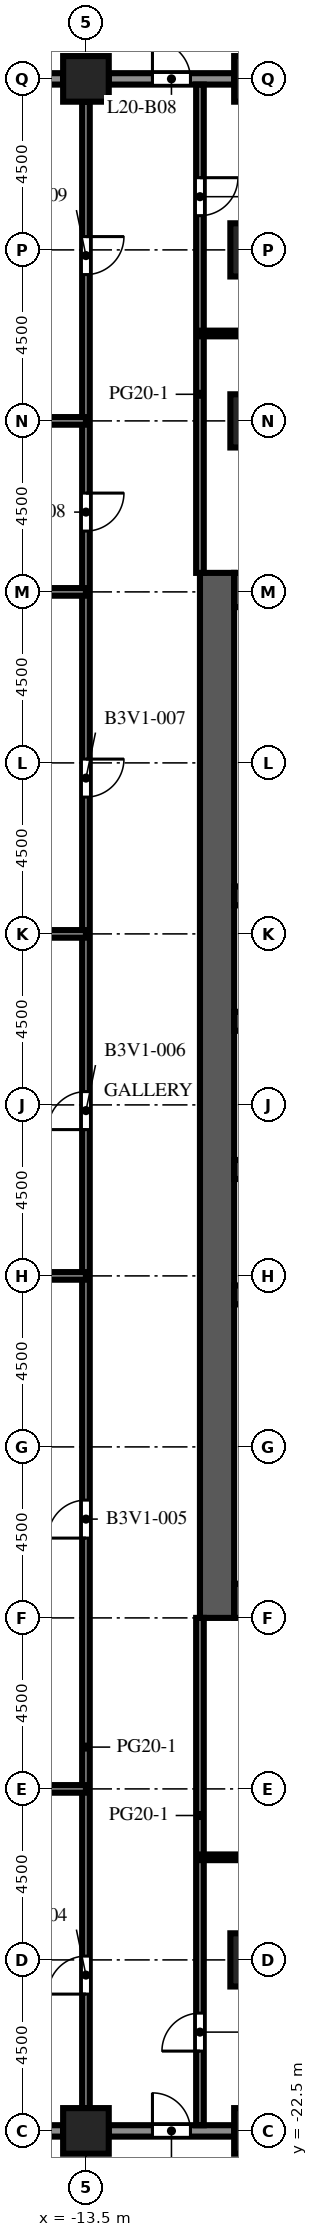
"""IFC4 building model, lengths in metres.
Left out: names, types, materials, properties, quantities, classifications, styles, units other than length and angle.
Written with IfcOpenShell. Run it as: python <this file> out.ifc"""

import sys

from ifc_helpers import new_model, si_unit, direction, frame, frame_2d, origin, origin_2d, place, context, subcontext, project, spatial, rectangle, extrude, element, fill, save


model = new_model("IFC4")
c1 = context("Model", 3, precision=1e-05, world=origin(), true_north=direction((0.0, 1.0)))
c2 = subcontext(c1, "Body", "Model", "MODEL_VIEW")
j1 = project(units=[si_unit("LENGTHUNIT", "METRE"), si_unit("PLANEANGLEUNIT", "RADIAN")], contexts=[c1])
p1 = place(None, origin())
s1 = spatial("IfcSite", under=j1, at=p1, CompositionType="ELEMENT")
p2 = place(p1, origin())
s2 = spatial("IfcBuilding", under=s1, at=p2, CompositionType="ELEMENT")
p3 = place(p2, frame((0.0, 0.0, 90.2)))
s3 = spatial("IfcBuildingStorey", under=s2, at=p3, CompositionType="ELEMENT", Elevation=90.2)
for number, where, z_axis, x_axis in (
    (1, (-13.5, -22.5, 0.0), (0.0, 0.0, 1.0), (1.0, 0.0, 0.0)),
    (2, (-13.5, 31.5, 0.0), (0.0, 0.0, 1.0), (1.0, 0.0, 0.0)),
    (3, (-9.0, -22.5, 0.0), (0.0, 0.0, 1.0), (1.0, 0.0, 0.0)),
    (4, (-9.0, 31.5, 0.0), (0.0, 0.0, 1.0), (1.0, 0.0, 0.0)),
):
    element("IfcColumn", number, at=place(p3, frame(where, z_axis=z_axis, x_axis=x_axis)), inside=s3, PredefinedType="COLUMN", context=c2, shape_type="SweptSolid", body=[
        extrude(rectangle(XDim=1.2, YDim=1.2, at=origin_2d()), origin(), (0.0, 0.0, 1.0), 4.1),
    ])
for number, where, z_axis, x_axis in (
    (5, (-9.0, -18.0, 0.0), (0.0, 0.0, 1.0), (1.0, 0.0, 0.0)),
    (6, (-9.0, 22.5, 0.0), (0.0, 0.0, 1.0), (1.0, 0.0, 0.0)),
    (7, (-9.0, 27.0, 0.0), (0.0, 0.0, 1.0), (1.0, 0.0, 0.0)),
):
    element("IfcColumn", number, at=place(p3, frame(where, z_axis=z_axis, x_axis=x_axis)), inside=s3, PredefinedType="COLUMN", context=c2, shape_type="SweptSolid", body=[
        extrude(rectangle(XDim=1.4, YDim=1.4, at=origin_2d()), origin(), (0.0, 0.0, 1.0), 4.1),
    ])
p4 = place(p3, frame((-10.05, -9.0, 0.0), z_axis=(0.0, 0.0, 1.0), x_axis=(0.0, 1.0, 0.0)))
e8 = element("IfcWall", 8, at=p4, inside=s3, PredefinedType="SHEAR", context=c2, shape_type="SweptSolid", body=[
    extrude(rectangle(XDim=27.5, YDim=0.9, at=frame_2d((13.75, 0.0))), origin(), (0.0, 0.0, 1.0), 4.1),
])
p5 = place(p4, frame((12.55, 0.0, 0.0)))
e9 = element("IfcOpeningElement", 9, at=p5, cuts=e8, PredefinedType="OPENING", context=c2, shape_type="SweptSolid", body=[
    extrude(rectangle(XDim=2.4, YDim=2.4, at=frame_2d((1.2, 1.2))), frame((0.0, 0.46, 0.0), z_axis=(0.0, -1.0, 0.0), x_axis=(1.0, 0.0, 0.0)), (0.0, 0.0, 1.0), 0.92),
])
p6 = place(p4, frame((6.825, 0.0, 0.0)))
e10 = element("IfcOpeningElement", 10, at=p6, cuts=e8, PredefinedType="OPENING", context=c2, shape_type="SweptSolid", body=[
    extrude(rectangle(XDim=1.2, YDim=2.1, at=frame_2d((0.6, 1.05))), frame((0.0, 0.46, 0.0), z_axis=(0.0, -1.0, 0.0), x_axis=(1.0, 0.0, 0.0)), (0.0, 0.0, 1.0), 0.92),
])
p7 = place(p4, frame((19.475, 0.0, 0.0)))
e11 = element("IfcOpeningElement", 11, at=p7, cuts=e8, PredefinedType="OPENING", context=c2, shape_type="SweptSolid", body=[
    extrude(rectangle(XDim=1.2, YDim=2.1, at=frame_2d((0.6, 1.05))), frame((0.0, 0.46, 0.0), z_axis=(0.0, -1.0, 0.0), x_axis=(1.0, 0.0, 0.0)), (0.0, 0.0, 1.0), 0.92),
])
for number, where, z_axis, x_axis in (
    (12, (-9.6, -8.55, 0.0), (0.0, 0.0, 1.0), (1.0, 0.0, 0.0)),
    (13, (-9.6, 18.05, 0.0), (0.0, 0.0, 1.0), (1.0, 0.0, 0.0)),
):
    element("IfcWall", number, at=place(p3, frame(where, z_axis=z_axis, x_axis=x_axis)), inside=s3, PredefinedType="SHEAR", context=c2, shape_type="SweptSolid", body=[
        extrude(rectangle(XDim=10.2, YDim=0.9, at=frame_2d((5.1, 0.0))), origin(), (0.0, 0.0, 1.0), 4.1),
    ])
p8 = place(p3, frame((-9.6, -0.5, 0.0), z_axis=(0.0, 0.0, 1.0), x_axis=(1.0, 0.0, 0.0)))
e14 = element("IfcWall", 14, at=p8, inside=s3, PredefinedType="SHEAR", context=c2, shape_type="SweptSolid", body=[
    extrude(rectangle(XDim=10.2, YDim=0.5, at=frame_2d((5.1, 0.0))), origin(), (0.0, 0.0, 1.0), 4.1),
])
p9 = place(p3, frame((-9.6, 2.8, 0.0), z_axis=(0.0, 0.0, 1.0), x_axis=(1.0, 0.0, 0.0)))
e15 = element("IfcWall", 15, at=p9, inside=s3, PredefinedType="SHEAR", context=c2, shape_type="SweptSolid", body=[
    extrude(rectangle(XDim=10.2, YDim=0.5, at=frame_2d((5.1, 0.0))), origin(), (0.0, 0.0, 1.0), 4.1),
])
p10 = place(p9, frame((0.562, 0.0, 0.0)))
e16 = element("IfcOpeningElement", 16, at=p10, cuts=e15, PredefinedType="OPENING", context=c2, shape_type="SweptSolid", body=[
    extrude(rectangle(XDim=1.1, YDim=2.1, at=frame_2d((0.55, 1.05))), frame((0.0, 0.26, 0.0), z_axis=(0.0, -1.0, 0.0), x_axis=(1.0, 0.0, 0.0)), (0.0, 0.0, 1.0), 0.52),
])
p11 = place(p9, frame((3.238, 0.0, 0.0)))
e17 = element("IfcOpeningElement", 17, at=p11, cuts=e15, PredefinedType="OPENING", context=c2, shape_type="SweptSolid", body=[
    extrude(rectangle(XDim=1.1, YDim=2.1, at=frame_2d((0.55, 1.05))), frame((0.0, 0.26, 0.0), z_axis=(0.0, -1.0, 0.0), x_axis=(1.0, 0.0, 0.0)), (0.0, 0.0, 1.0), 0.52),
])
p12 = place(p9, frame((8.538, 0.0, 0.0)))
e18 = element("IfcOpeningElement", 18, at=p12, cuts=e15, PredefinedType="OPENING", context=c2, shape_type="SweptSolid", body=[
    extrude(rectangle(XDim=1.1, YDim=2.1, at=frame_2d((0.55, 1.05))), frame((0.0, 0.26, 0.0), z_axis=(0.0, -1.0, 0.0), x_axis=(1.0, 0.0, 0.0)), (0.0, 0.0, 1.0), 0.52),
])
p13 = place(p3, frame((-9.6, 6.7, 0.0), z_axis=(0.0, 0.0, 1.0), x_axis=(1.0, 0.0, 0.0)))
e19 = element("IfcWall", 19, at=p13, inside=s3, PredefinedType="SHEAR", context=c2, shape_type="SweptSolid", body=[
    extrude(rectangle(XDim=10.2, YDim=0.5, at=frame_2d((5.1, 0.0))), origin(), (0.0, 0.0, 1.0), 4.1),
])
p14 = place(p13, frame((0.562, 0.0, 0.0)))
e20 = element("IfcOpeningElement", 20, at=p14, cuts=e19, PredefinedType="OPENING", context=c2, shape_type="SweptSolid", body=[
    extrude(rectangle(XDim=1.1, YDim=2.1, at=frame_2d((0.55, 1.05))), frame((0.0, 0.26, 0.0), z_axis=(0.0, -1.0, 0.0), x_axis=(1.0, 0.0, 0.0)), (0.0, 0.0, 1.0), 0.52),
])
p15 = place(p13, frame((3.288, 0.0, 0.0)))
e21 = element("IfcOpeningElement", 21, at=p15, cuts=e19, PredefinedType="OPENING", context=c2, shape_type="SweptSolid", body=[
    extrude(rectangle(XDim=1.0, YDim=2.1, at=frame_2d((0.5, 1.05))), frame((0.0, 0.26, 0.0), z_axis=(0.0, -1.0, 0.0), x_axis=(1.0, 0.0, 0.0)), (0.0, 0.0, 1.0), 0.52),
])
p16 = place(p13, frame((5.913, 0.0, 0.0)))
e22 = element("IfcOpeningElement", 22, at=p16, cuts=e19, PredefinedType="OPENING", context=c2, shape_type="SweptSolid", body=[
    extrude(rectangle(XDim=1.0, YDim=2.1, at=frame_2d((0.5, 1.05))), frame((0.0, 0.26, 0.0), z_axis=(0.0, -1.0, 0.0), x_axis=(1.0, 0.0, 0.0)), (0.0, 0.0, 1.0), 0.52),
])
p17 = place(p13, frame((8.587, 0.0, 0.0)))
e23 = element("IfcOpeningElement", 23, at=p17, cuts=e19, PredefinedType="OPENING", context=c2, shape_type="SweptSolid", body=[
    extrude(rectangle(XDim=1.0, YDim=2.1, at=frame_2d((0.5, 1.05))), frame((0.0, 0.26, 0.0), z_axis=(0.0, -1.0, 0.0), x_axis=(1.0, 0.0, 0.0)), (0.0, 0.0, 1.0), 0.52),
])
p18 = place(p3, frame((-9.6, 10.0, 0.0), z_axis=(0.0, 0.0, 1.0), x_axis=(1.0, 0.0, 0.0)))
e24 = element("IfcWall", 24, at=p18, inside=s3, PredefinedType="SHEAR", context=c2, shape_type="SweptSolid", body=[
    extrude(rectangle(XDim=10.2, YDim=0.5, at=frame_2d((5.1, 0.0))), origin(), (0.0, 0.0, 1.0), 4.1),
])
p19 = place(p3, frame((-14.1, -22.5, 0.0), z_axis=(0.0, 0.0, 1.0), x_axis=(-1.0, 0.0, 0.0)))
e25 = element("IfcWall", 25, at=p19, inside=s3, PredefinedType="SOLIDWALL", context=c2, shape_type="SweptSolid", body=[
    extrude(rectangle(XDim=3.3, YDim=0.3, at=frame_2d((1.65, 0.0))), origin(), (0.0, 0.0, 1.0), 2.75),
])
p20 = place(p19, frame((0.45, 0.0, 0.8)))
e26 = element("IfcOpeningElement", 26, at=p20, cuts=e25, PredefinedType="OPENING", context=c2, shape_type="SweptSolid", body=[
    extrude(rectangle(XDim=2.4, YDim=1.7, at=frame_2d((1.2, 0.85))), frame((0.0, 0.16, 0.0), z_axis=(0.0, -1.0, 0.0), x_axis=(1.0, 0.0, 0.0)), (0.0, 0.0, 1.0), 0.32),
])
p21 = place(p3, frame((-9.6, -22.5, 0.0), z_axis=(0.0, 0.0, 1.0), x_axis=(-1.0, 0.0, 0.0)))
e27 = element("IfcWall", 27, at=p21, inside=s3, PredefinedType="SOLIDWALL", context=c2, shape_type="SweptSolid", body=[
    extrude(rectangle(XDim=3.3, YDim=0.3, at=frame_2d((1.65, 0.0))), origin(), (0.0, 0.0, 1.0), 2.75),
])
p22 = place(p21, frame((1.15, 0.0, 0.0)))
e28 = element("IfcOpeningElement", 28, at=p22, cuts=e27, PredefinedType="OPENING", context=c2, shape_type="SweptSolid", body=[
    extrude(rectangle(XDim=1.0, YDim=2.2, at=frame_2d((0.5, 1.1))), frame((0.0, 0.16, 0.0), z_axis=(0.0, -1.0, 0.0), x_axis=(1.0, 0.0, 0.0)), (0.0, 0.0, 1.0), 0.32),
])
p23 = place(p3, frame((-12.9, 31.5, 0.0), z_axis=(0.0, 0.0, 1.0), x_axis=(1.0, 0.0, 0.0)))
e29 = element("IfcWall", 29, at=p23, inside=s3, PredefinedType="SOLIDWALL", context=c2, shape_type="SweptSolid", body=[
    extrude(rectangle(XDim=3.3, YDim=0.3, at=frame_2d((1.65, 0.0))), origin(), (0.0, 0.0, 1.0), 2.75),
])
p24 = place(p23, frame((1.15, 0.0, 0.0)))
e30 = element("IfcOpeningElement", 30, at=p24, cuts=e29, PredefinedType="OPENING", context=c2, shape_type="SweptSolid", body=[
    extrude(rectangle(XDim=1.0, YDim=2.2, at=frame_2d((0.5, 1.1))), frame((0.0, 0.16, 0.0), z_axis=(0.0, -1.0, 0.0), x_axis=(1.0, 0.0, 0.0)), (0.0, 0.0, 1.0), 0.32),
])
p25 = place(p3, frame((-17.4, 31.5, 0.0), z_axis=(0.0, 0.0, 1.0), x_axis=(1.0, 0.0, 0.0)))
e31 = element("IfcWall", 31, at=p25, inside=s3, PredefinedType="SOLIDWALL", context=c2, shape_type="SweptSolid", body=[
    extrude(rectangle(XDim=3.3, YDim=0.3, at=frame_2d((1.65, 0.0))), origin(), (0.0, 0.0, 1.0), 2.75),
])
p26 = place(p25, frame((0.45, 0.0, 0.8)))
e32 = element("IfcOpeningElement", 32, at=p26, cuts=e31, PredefinedType="OPENING", context=c2, shape_type="SweptSolid", body=[
    extrude(rectangle(XDim=2.4, YDim=1.7, at=frame_2d((1.2, 0.85))), frame((0.0, 0.16, 0.0), z_axis=(0.0, -1.0, 0.0), x_axis=(1.0, 0.0, 0.0)), (0.0, 0.0, 1.0), 0.32),
])
p27 = place(p3, frame((-13.5, -21.9, 0.0), z_axis=(0.0, 0.0, 1.0), x_axis=(0.0, 1.0, 0.0)))
e33 = element("IfcWall", 33, at=p27, inside=s3, PredefinedType="PARTITIONING", context=c2, shape_type="SweptSolid", body=[
    extrude(rectangle(XDim=52.8, YDim=0.2, at=frame_2d((26.4, 0.0))), origin(), (0.0, 0.0, 1.0), 3.65),
])
p28 = place(p27, frame((3.0, 0.0, 0.0)))
e34 = element("IfcOpeningElement", 34, at=p28, cuts=e33, PredefinedType="OPENING", context=c2, shape_type="SweptSolid", body=[
    extrude(rectangle(XDim=1.0, YDim=2.1, at=frame_2d((0.5, 1.05))), frame((0.0, 0.11, 0.0), z_axis=(0.0, -1.0, 0.0), x_axis=(1.0, 0.0, 0.0)), (0.0, 0.0, 1.0), 0.22),
])
p29 = place(p27, frame((15.0, 0.0, 0.0)))
e35 = element("IfcOpeningElement", 35, at=p29, cuts=e33, PredefinedType="OPENING", context=c2, shape_type="SweptSolid", body=[
    extrude(rectangle(XDim=1.0, YDim=2.1, at=frame_2d((0.5, 1.05))), frame((0.0, 0.11, 0.0), z_axis=(0.0, -1.0, 0.0), x_axis=(1.0, 0.0, 0.0)), (0.0, 0.0, 1.0), 0.22),
])
p30 = place(p27, frame((25.75, 0.0, 0.0)))
e36 = element("IfcOpeningElement", 36, at=p30, cuts=e33, PredefinedType="OPENING", context=c2, shape_type="SweptSolid", body=[
    extrude(rectangle(XDim=1.0, YDim=2.1, at=frame_2d((0.5, 1.05))), frame((0.0, 0.11, 0.0), z_axis=(0.0, -1.0, 0.0), x_axis=(1.0, 0.0, 0.0)), (0.0, 0.0, 1.0), 0.22),
])
p31 = place(p27, frame((34.5, 0.0, 0.0)))
e37 = element("IfcOpeningElement", 37, at=p31, cuts=e33, PredefinedType="OPENING", context=c2, shape_type="SweptSolid", body=[
    extrude(rectangle(XDim=1.0, YDim=2.1, at=frame_2d((0.5, 1.05))), frame((0.0, 0.11, 0.0), z_axis=(0.0, -1.0, 0.0), x_axis=(1.0, 0.0, 0.0)), (0.0, 0.0, 1.0), 0.22),
])
p32 = place(p27, frame((41.5, 0.0, 0.0)))
e38 = element("IfcOpeningElement", 38, at=p32, cuts=e33, PredefinedType="OPENING", context=c2, shape_type="SweptSolid", body=[
    extrude(rectangle(XDim=1.0, YDim=2.1, at=frame_2d((0.5, 1.05))), frame((0.0, 0.11, 0.0), z_axis=(0.0, -1.0, 0.0), x_axis=(1.0, 0.0, 0.0)), (0.0, 0.0, 1.0), 0.22),
])
p33 = place(p27, frame((48.25, 0.0, 0.0)))
e39 = element("IfcOpeningElement", 39, at=p33, cuts=e33, PredefinedType="OPENING", context=c2, shape_type="SweptSolid", body=[
    extrude(rectangle(XDim=1.0, YDim=2.1, at=frame_2d((0.5, 1.05))), frame((0.0, 0.11, 0.0), z_axis=(0.0, -1.0, 0.0), x_axis=(1.0, 0.0, 0.0)), (0.0, 0.0, 1.0), 0.22),
])
p34 = place(p3, frame((-10.5, -9.0, 0.0), z_axis=(0.0, 0.0, 1.0), x_axis=(0.0, -1.0, 0.0)))
e40 = element("IfcWall", 40, at=p34, inside=s3, PredefinedType="PARTITIONING", context=c2, shape_type="SweptSolid", body=[
    extrude(rectangle(XDim=13.35, YDim=0.2, at=frame_2d((6.675, 0.0))), origin(), (0.0, 0.0, 1.0), 3.65),
])
p35 = place(p34, frame((10.4, 0.0, 0.0)))
e41 = element("IfcOpeningElement", 41, at=p35, cuts=e40, PredefinedType="OPENING", context=c2, shape_type="SweptSolid", body=[
    extrude(rectangle(XDim=1.0, YDim=2.1, at=frame_2d((0.5, 1.05))), frame((0.0, 0.11, 0.0), z_axis=(0.0, -1.0, 0.0), x_axis=(1.0, 0.0, 0.0)), (0.0, 0.0, 1.0), 0.22),
])
p36 = place(p3, frame((-10.5, 31.35, 0.0), z_axis=(0.0, 0.0, 1.0), x_axis=(0.0, -1.0, 0.0)))
e42 = element("IfcWall", 42, at=p36, inside=s3, PredefinedType="PARTITIONING", context=c2, shape_type="SweptSolid", body=[
    extrude(rectangle(XDim=12.85, YDim=0.2, at=frame_2d((6.425, 0.0))), origin(), (0.0, 0.0, 1.0), 3.65),
])
p37 = place(p36, frame((2.45, 0.0, 0.0)))
e43 = element("IfcOpeningElement", 43, at=p37, cuts=e42, PredefinedType="OPENING", context=c2, shape_type="SweptSolid", body=[
    extrude(rectangle(XDim=1.0, YDim=2.1, at=frame_2d((0.5, 1.05))), frame((0.0, 0.11, 0.0), z_axis=(0.0, -1.0, 0.0), x_axis=(1.0, 0.0, 0.0)), (0.0, 0.0, 1.0), 0.22),
])
p38 = place(p3, frame((-10.5, -15.3, 0.0), z_axis=(0.0, 0.0, 1.0), x_axis=(1.0, 0.0, 0.0)))
e44 = element("IfcWall", 44, at=p38, inside=s3, PredefinedType="PARTITIONING", context=c2, shape_type="SweptSolid", body=[
    extrude(rectangle(XDim=28.5, YDim=0.15, at=frame_2d((14.25, 0.0))), origin(), (0.0, 0.0, 1.0), 3.65),
])
p39 = place(p38, frame((5.35, 0.0, 0.0)))
e45 = element("IfcOpeningElement", 45, at=p39, cuts=e44, PredefinedType="OPENING", context=c2, shape_type="SweptSolid", body=[
    extrude(rectangle(XDim=1.0, YDim=2.1, at=frame_2d((0.5, 1.05))), frame((0.0, 0.085, 0.0), z_axis=(0.0, -1.0, 0.0), x_axis=(1.0, 0.0, 0.0)), (0.0, 0.0, 1.0), 0.17),
])
p40 = place(p38, frame((18.1, 0.0, 0.0)))
e46 = element("IfcOpeningElement", 46, at=p40, cuts=e44, PredefinedType="OPENING", context=c2, shape_type="SweptSolid", body=[
    extrude(rectangle(XDim=1.0, YDim=2.1, at=frame_2d((0.5, 1.05))), frame((0.0, 0.085, 0.0), z_axis=(0.0, -1.0, 0.0), x_axis=(1.0, 0.0, 0.0)), (0.0, 0.0, 1.0), 0.17),
])
p41 = place(p38, frame((26.1, 0.0, 0.0)))
e47 = element("IfcOpeningElement", 47, at=p41, cuts=e44, PredefinedType="OPENING", context=c2, shape_type="SweptSolid", body=[
    extrude(rectangle(XDim=1.0, YDim=2.1, at=frame_2d((0.5, 1.05))), frame((0.0, 0.085, 0.0), z_axis=(0.0, -1.0, 0.0), x_axis=(1.0, 0.0, 0.0)), (0.0, 0.0, 1.0), 0.17),
])
p42 = place(p3, frame((-21.9, -13.5, 0.0), z_axis=(0.0, 0.0, 1.0), x_axis=(1.0, 0.0, 0.0)))
e48 = element("IfcWall", 48, at=p42, inside=s3, PredefinedType="PARTITIONING", context=c2, shape_type="SweptSolid", body=[
    extrude(rectangle(XDim=8.4, YDim=0.2, at=frame_2d((4.2, 0.0))), origin(), (0.0, 0.0, 1.0), 3.65),
])
for number, where, z_axis, x_axis in (
    (49, (-17.3, 0.0, 0.0), (0.0, 0.0, 1.0), (1.0, 0.0, 0.0)),
    (50, (-17.3, 9.0, 0.0), (0.0, 0.0, 1.0), (1.0, 0.0, 0.0)),
    (51, (-17.3, 18.0, 0.0), (0.0, 0.0, 1.0), (1.0, 0.0, 0.0)),
    (52, (-17.3, 22.5, 0.0), (0.0, 0.0, 1.0), (1.0, 0.0, 0.0)),
):
    element("IfcWall", number, at=place(p3, frame(where, z_axis=z_axis, x_axis=x_axis)), inside=s3, PredefinedType="PARTITIONING", context=c2, shape_type="SweptSolid", body=[
        extrude(rectangle(XDim=3.8, YDim=0.2, at=frame_2d((1.9, 0.0))), origin(), (0.0, 0.0, 1.0), 3.65),
    ])
p43 = place(p3, frame((18.0, 24.8, 0.0), z_axis=(0.0, 0.0, 1.0), x_axis=(-1.0, 0.0, 0.0)))
e53 = element("IfcWall", 53, at=p43, inside=s3, PredefinedType="PARTITIONING", context=c2, shape_type="SweptSolid", body=[
    extrude(rectangle(XDim=28.5, YDim=0.15, at=frame_2d((14.25, 0.0))), origin(), (0.0, 0.0, 1.0), 3.65),
])
p44 = place(p43, frame((23.65, 0.0, 0.0)))
e54 = element("IfcOpeningElement", 54, at=p44, cuts=e53, PredefinedType="OPENING", context=c2, shape_type="SweptSolid", body=[
    extrude(rectangle(XDim=1.0, YDim=2.1, at=frame_2d((0.5, 1.05))), frame((0.0, 0.085, 0.0), z_axis=(0.0, -1.0, 0.0), x_axis=(1.0, 0.0, 0.0)), (0.0, 0.0, 1.0), 0.17),
])
p45 = place(p43, frame((12.65, 0.0, 0.0)))
e55 = element("IfcOpeningElement", 55, at=p45, cuts=e53, PredefinedType="OPENING", context=c2, shape_type="SweptSolid", body=[
    extrude(rectangle(XDim=1.0, YDim=2.1, at=frame_2d((0.5, 1.05))), frame((0.0, 0.085, 0.0), z_axis=(0.0, -1.0, 0.0), x_axis=(1.0, 0.0, 0.0)), (0.0, 0.0, 1.0), 0.17),
])
p46 = place(p43, frame((1.9, 0.0, 0.0)))
e56 = element("IfcOpeningElement", 56, at=p46, cuts=e53, PredefinedType="OPENING", context=c2, shape_type="SweptSolid", body=[
    extrude(rectangle(XDim=1.0, YDim=2.1, at=frame_2d((0.5, 1.05))), frame((0.0, 0.085, 0.0), z_axis=(0.0, -1.0, 0.0), x_axis=(1.0, 0.0, 0.0)), (0.0, 0.0, 1.0), 0.17),
])
p47 = place(p22, origin())
e57 = element("IfcDoor", 57, at=p47, inside=s3, OperationType="SINGLE_SWING_RIGHT", PredefinedType="DOOR", context=c2, shape_type="SweptSolid", body=[
    extrude(rectangle(XDim=1.0, YDim=2.2, at=frame_2d((0.5, 1.1))), frame((0.0, 0.025, 0.0), z_axis=(0.0, -1.0, 0.0), x_axis=(1.0, 0.0, 0.0)), (0.0, 0.0, 1.0), 0.05),
])
fill(e28, e57)
p48 = place(p24, origin())
e58 = element("IfcDoor", 58, at=p48, inside=s3, OperationType="SINGLE_SWING_LEFT", PredefinedType="DOOR", context=c2, shape_type="SweptSolid", body=[
    extrude(rectangle(XDim=1.0, YDim=2.2, at=frame_2d((0.5, 1.1))), frame((0.0, 0.025, 0.0), z_axis=(0.0, -1.0, 0.0), x_axis=(1.0, 0.0, 0.0)), (0.0, 0.0, 1.0), 0.05),
])
fill(e30, e58)
p49 = place(p5, origin())
e59 = element("IfcDoor", 59, at=p49, inside=s3, OperationType="DOUBLE_DOOR_DOUBLE_SWING", PredefinedType="DOOR", context=c2, shape_type="SweptSolid", body=[
    extrude(rectangle(XDim=2.4, YDim=2.4, at=frame_2d((1.2, 1.2))), frame((0.0, 0.025, 0.0), z_axis=(0.0, -1.0, 0.0), x_axis=(1.0, 0.0, 0.0)), (0.0, 0.0, 1.0), 0.05),
])
fill(e9, e59)
p50 = place(p6, origin())
e60 = element("IfcDoor", 60, at=p50, inside=s3, OperationType="SINGLE_SWING_LEFT", PredefinedType="DOOR", context=c2, shape_type="SweptSolid", body=[
    extrude(rectangle(XDim=1.2, YDim=2.1, at=frame_2d((0.6, 1.05))), frame((0.0, 0.025, 0.0), z_axis=(0.0, -1.0, 0.0), x_axis=(1.0, 0.0, 0.0)), (0.0, 0.0, 1.0), 0.05),
])
fill(e10, e60)
p51 = place(p7, origin())
e61 = element("IfcDoor", 61, at=p51, inside=s3, OperationType="SINGLE_SWING_LEFT", PredefinedType="DOOR", context=c2, shape_type="SweptSolid", body=[
    extrude(rectangle(XDim=1.2, YDim=2.1, at=frame_2d((0.6, 1.05))), frame((0.0, 0.025, 0.0), z_axis=(0.0, -1.0, 0.0), x_axis=(1.0, 0.0, 0.0)), (0.0, 0.0, 1.0), 0.05),
])
fill(e11, e61)
p52 = place(p28, origin())
e62 = element("IfcDoor", 62, at=p52, inside=s3, OperationType="SINGLE_SWING_LEFT", PredefinedType="DOOR", context=c2, shape_type="SweptSolid", body=[
    extrude(rectangle(XDim=1.0, YDim=2.1, at=frame_2d((0.5, 1.05))), frame((0.0, 0.025, 0.0), z_axis=(0.0, -1.0, 0.0), x_axis=(1.0, 0.0, 0.0)), (0.0, 0.0, 1.0), 0.05),
])
fill(e34, e62)
p53 = place(p29, origin())
e63 = element("IfcDoor", 63, at=p53, inside=s3, OperationType="SINGLE_SWING_LEFT", PredefinedType="DOOR", context=c2, shape_type="SweptSolid", body=[
    extrude(rectangle(XDim=1.0, YDim=2.1, at=frame_2d((0.5, 1.05))), frame((0.0, 0.025, 0.0), z_axis=(0.0, -1.0, 0.0), x_axis=(1.0, 0.0, 0.0)), (0.0, 0.0, 1.0), 0.05),
])
fill(e35, e63)
p54 = place(p30, origin())
e64 = element("IfcDoor", 64, at=p54, inside=s3, OperationType="SINGLE_SWING_LEFT", PredefinedType="DOOR", context=c2, shape_type="SweptSolid", body=[
    extrude(rectangle(XDim=1.0, YDim=2.1, at=frame_2d((0.5, 1.05))), frame((0.0, 0.025, 0.0), z_axis=(0.0, -1.0, 0.0), x_axis=(1.0, 0.0, 0.0)), (0.0, 0.0, 1.0), 0.05),
])
fill(e36, e64)
p55 = place(p31, origin())
e65 = element("IfcDoor", 65, at=p55, inside=s3, OperationType="SINGLE_SWING_RIGHT", PredefinedType="DOOR", context=c2, shape_type="SweptSolid", body=[
    extrude(rectangle(XDim=1.0, YDim=2.1, at=frame_2d((0.5, 1.05))), frame((0.0, 0.025, 0.0), z_axis=(0.0, -1.0, 0.0), x_axis=(1.0, 0.0, 0.0)), (0.0, 0.0, 1.0), 0.05),
])
fill(e37, e65)
p56 = place(p32, origin())
e66 = element("IfcDoor", 66, at=p56, inside=s3, OperationType="SINGLE_SWING_RIGHT", PredefinedType="DOOR", context=c2, shape_type="SweptSolid", body=[
    extrude(rectangle(XDim=1.0, YDim=2.1, at=frame_2d((0.5, 1.05))), frame((0.0, 0.025, 0.0), z_axis=(0.0, -1.0, 0.0), x_axis=(1.0, 0.0, 0.0)), (0.0, 0.0, 1.0), 0.05),
])
fill(e38, e66)
p57 = place(p33, origin())
e67 = element("IfcDoor", 67, at=p57, inside=s3, OperationType="SINGLE_SWING_RIGHT", PredefinedType="DOOR", context=c2, shape_type="SweptSolid", body=[
    extrude(rectangle(XDim=1.0, YDim=2.1, at=frame_2d((0.5, 1.05))), frame((0.0, 0.025, 0.0), z_axis=(0.0, -1.0, 0.0), x_axis=(1.0, 0.0, 0.0)), (0.0, 0.0, 1.0), 0.05),
])
fill(e39, e67)
p58 = place(p35, origin())
e68 = element("IfcDoor", 68, at=p58, inside=s3, OperationType="SINGLE_SWING_RIGHT", PredefinedType="DOOR", context=c2, shape_type="SweptSolid", body=[
    extrude(rectangle(XDim=1.0, YDim=2.1, at=frame_2d((0.5, 1.05))), frame((0.0, 0.025, 0.0), z_axis=(0.0, -1.0, 0.0), x_axis=(1.0, 0.0, 0.0)), (0.0, 0.0, 1.0), 0.05),
])
fill(e41, e68)
p59 = place(p37, origin())
e69 = element("IfcDoor", 69, at=p59, inside=s3, OperationType="SINGLE_SWING_LEFT", PredefinedType="DOOR", context=c2, shape_type="SweptSolid", body=[
    extrude(rectangle(XDim=1.0, YDim=2.1, at=frame_2d((0.5, 1.05))), frame((0.0, 0.025, 0.0), z_axis=(0.0, -1.0, 0.0), x_axis=(1.0, 0.0, 0.0)), (0.0, 0.0, 1.0), 0.05),
])
fill(e43, e69)
save(model, sys.argv[1])
